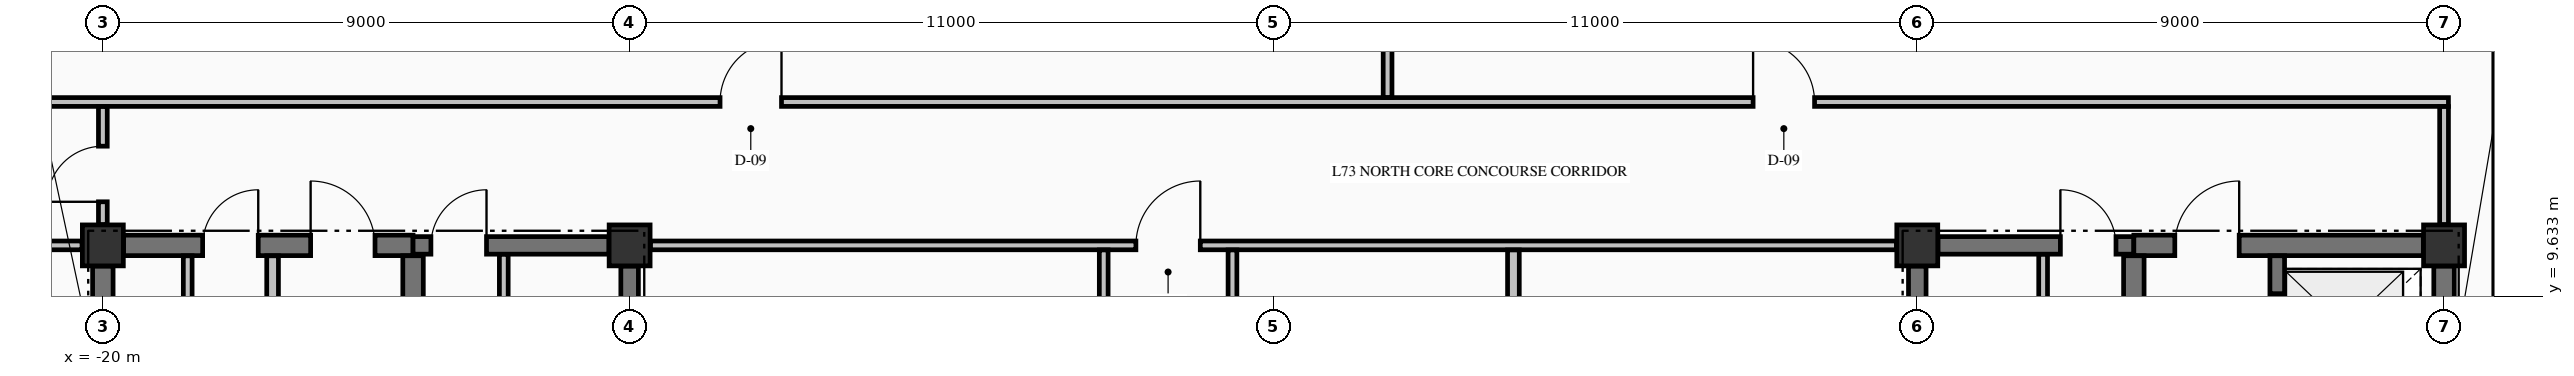
"""IFC4 building model, lengths in metres.
Left out: names, types, materials, properties, quantities, classifications, styles, units other than length and angle.
Written with IfcOpenShell. Run it as: python <this file> out.ifc"""

import sys

from ifc_helpers import new_model, si_unit, direction, frame, frame_2d, origin, origin_2d, place, context, subcontext, project, spatial, rectangle, extrude, element, fill, save


model = new_model("IFC4")
c1 = context("Model", 3, precision=1e-05, world=origin(), true_north=direction((0.0, 1.0)))
c2 = subcontext(c1, "Body", "Model", "MODEL_VIEW")
j1 = project(units=[si_unit("LENGTHUNIT", "METRE"), si_unit("PLANEANGLEUNIT", "RADIAN")], contexts=[c1])
p1 = place(None, origin())
s1 = spatial("IfcSite", under=j1, at=p1, CompositionType="ELEMENT")
p2 = place(p1, origin())
s2 = spatial("IfcBuilding", under=s1, at=p2, CompositionType="ELEMENT")
p3 = place(p2, frame((0.0, 0.0, 274.32)))
s3 = spatial("IfcBuildingStorey", under=s2, at=p3, CompositionType="ELEMENT", Elevation=274.32)
for number, where, z_axis, x_axis in (
    (1, (-20.0, 10.5, -0.25), (0.0, 0.0, 1.0), (1.0, 0.0, 0.0)),
    (2, (-11.0, 10.5, -0.25), (0.0, 0.0, 1.0), (1.0, 0.0, 0.0)),
    (3, (11.0, 10.5, -0.25), (0.0, 0.0, 1.0), (1.0, 0.0, 0.0)),
    (4, (20.0, 10.5, -0.25), (0.0, 0.0, 1.0), (1.0, 0.0, 0.0)),
):
    element("IfcColumn", number, at=place(p3, frame(where, z_axis=z_axis, x_axis=x_axis)), inside=s3, PredefinedType="COLUMN", context=c2, shape_type="SweptSolid", body=[
        extrude(rectangle(XDim=0.7, YDim=0.7, at=origin_2d()), origin(), (0.0, 0.0, 1.0), 3.565),
    ])
p4 = place(p3, frame((21.0, 9.455, 0.0), z_axis=(0.0, 0.0, 1.0), x_axis=(0.0, 1.0, 0.0)))
e5 = element("IfcWall", 5, at=p4, inside=s3, PredefinedType="STANDARD", context=c2, shape_type="SweptSolid", body=[
    extrude(rectangle(XDim=8.09, YDim=0.3, at=frame_2d((4.045, 0.0))), origin(), (0.0, 0.0, 1.0), 2.707),
])
p5 = place(p3, frame((-19.646, 10.5, 0.0), z_axis=(0.0, 0.0, 1.0), x_axis=(1.0, 0.0, 0.0)))
e6 = element("IfcWall", 6, at=p5, inside=s3, PredefinedType="SHEAR", context=c2, shape_type="SweptSolid", body=[
    extrude(rectangle(XDim=4.946, YDim=0.35, at=frame_2d((2.473, 0.0))), origin(), (0.0, 0.0, 1.0), 3.315),
])
p6 = place(p5, frame((3.196, 0.0, 0.0)))
e7 = element("IfcOpeningElement", 7, at=p6, cuts=e6, PredefinedType="OPENING", context=c2, shape_type="SweptSolid", body=[
    extrude(rectangle(XDim=1.1, YDim=2.15, at=frame_2d((0.55, 1.075))), frame((0.0, 0.185, 0.0), z_axis=(0.0, -1.0, 0.0), x_axis=(1.0, 0.0, 0.0)), (0.0, 0.0, 1.0), 0.37),
])
p7 = place(p5, frame((1.351, 0.0, 0.0)))
e8 = element("IfcOpeningElement", 8, at=p7, cuts=e6, PredefinedType="OPENING", context=c2, shape_type="SweptSolid", body=[
    extrude(rectangle(XDim=0.95, YDim=2.15, at=frame_2d((0.475, 1.075))), frame((0.0, 0.185, 0.0), z_axis=(0.0, -1.0, 0.0), x_axis=(1.0, 0.0, 0.0)), (0.0, 0.0, 1.0), 0.37),
])
p8 = place(p3, frame((-14.7, 10.5, 0.0), z_axis=(0.0, 0.0, 1.0), x_axis=(1.0, 0.0, 0.0)))
e9 = element("IfcWall", 9, at=p8, inside=s3, PredefinedType="SHEAR", context=c2, shape_type="SweptSolid", body=[
    extrude(rectangle(XDim=3.346, YDim=0.3, at=frame_2d((1.673, 0.0))), origin(), (0.0, 0.0, 1.0), 3.315),
])
p9 = place(p8, frame((0.305, 0.0, 0.0)))
e10 = element("IfcOpeningElement", 10, at=p9, cuts=e9, PredefinedType="OPENING", context=c2, shape_type="SweptSolid", body=[
    extrude(rectangle(XDim=0.95, YDim=2.15, at=frame_2d((0.475, 1.075))), frame((0.0, 0.16, 0.0), z_axis=(0.0, -1.0, 0.0), x_axis=(1.0, 0.0, 0.0)), (0.0, 0.0, 1.0), 0.32),
])
p10 = place(p3, frame((11.354, 10.5, 0.0), z_axis=(0.0, 0.0, 1.0), x_axis=(1.0, 0.0, 0.0)))
e11 = element("IfcWall", 11, at=p10, inside=s3, PredefinedType="SHEAR", context=c2, shape_type="SweptSolid", body=[
    extrude(rectangle(XDim=3.346, YDim=0.3, at=frame_2d((1.673, 0.0))), origin(), (0.0, 0.0, 1.0), 3.315),
])
p11 = place(p10, frame((2.091, 0.0, 0.0)))
e12 = element("IfcOpeningElement", 12, at=p11, cuts=e11, PredefinedType="OPENING", context=c2, shape_type="SweptSolid", body=[
    extrude(rectangle(XDim=0.95, YDim=2.15, at=frame_2d((0.475, 1.075))), frame((0.0, 0.16, 0.0), z_axis=(0.0, -1.0, 0.0), x_axis=(1.0, 0.0, 0.0)), (0.0, 0.0, 1.0), 0.32),
])
p12 = place(p3, frame((14.7, 10.5, 0.0), z_axis=(0.0, 0.0, 1.0), x_axis=(1.0, 0.0, 0.0)))
e13 = element("IfcWall", 13, at=p12, inside=s3, PredefinedType="SHEAR", context=c2, shape_type="SweptSolid", body=[
    extrude(rectangle(XDim=4.946, YDim=0.35, at=frame_2d((2.473, 0.0))), origin(), (0.0, 0.0, 1.0), 3.315),
])
p13 = place(p12, frame((0.7, 0.0, 0.0)))
e14 = element("IfcOpeningElement", 14, at=p13, cuts=e13, PredefinedType="OPENING", context=c2, shape_type="SweptSolid", body=[
    extrude(rectangle(XDim=1.1, YDim=2.15, at=frame_2d((0.55, 1.075))), frame((0.0, 0.185, 0.0), z_axis=(0.0, -1.0, 0.0), x_axis=(1.0, 0.0, 0.0)), (0.0, 0.0, 1.0), 0.37),
])
p14 = place(p3, frame((-25.835, 10.5, 0.0), z_axis=(0.0, 0.0, 1.0), x_axis=(1.0, 0.0, 0.0)))
e15 = element("IfcWall", 15, at=p14, inside=s3, PredefinedType="PARTITIONING", context=c2, shape_type="SweptSolid", body=[
    extrude(rectangle(XDim=5.479, YDim=0.15, at=frame_2d((2.74, 0.0))), origin(), (0.0, 0.0, 1.0), 3.315),
])
p15 = place(p14, frame((2.335, 0.0, 0.0)))
e16 = element("IfcOpeningElement", 16, at=p15, cuts=e15, PredefinedType="OPENING", context=c2, shape_type="SweptSolid", body=[
    extrude(rectangle(XDim=1.0, YDim=2.15, at=frame_2d((0.5, 1.075))), frame((0.0, 0.085, 0.0), z_axis=(0.0, -1.0, 0.0), x_axis=(1.0, 0.0, 0.0)), (0.0, 0.0, 1.0), 0.17),
])
p16 = place(p3, frame((-10.644, 10.5, 0.0), z_axis=(0.0, 0.0, 1.0), x_axis=(1.0, 0.0, 0.0)))
e17 = element("IfcWall", 17, at=p16, inside=s3, PredefinedType="PARTITIONING", context=c2, shape_type="SweptSolid", body=[
    extrude(rectangle(XDim=21.288, YDim=0.15, at=frame_2d((10.644, 0.0))), origin(), (0.0, 0.0, 1.0), 3.315),
])
p17 = place(p16, frame((8.294, 0.0, 0.0)))
e18 = element("IfcOpeningElement", 18, at=p17, cuts=e17, PredefinedType="OPENING", context=c2, shape_type="SweptSolid", body=[
    extrude(rectangle(XDim=1.1, YDim=2.15, at=frame_2d((0.55, 1.075))), frame((0.0, 0.085, 0.0), z_axis=(0.0, -1.0, 0.0), x_axis=(1.0, 0.0, 0.0)), (0.0, 0.0, 1.0), 0.17),
])
p18 = place(p3, frame((-25.835, 12.95, 0.0), z_axis=(0.0, 0.0, 1.0), x_axis=(1.0, 0.0, 0.0)))
e19 = element("IfcWall", 19, at=p18, inside=s3, PredefinedType="PARTITIONING", context=c2, shape_type="SweptSolid", body=[
    extrude(rectangle(XDim=45.91, YDim=0.15, at=frame_2d((22.955, 0.0))), origin(), (0.0, 0.0, 1.0), 3.315),
])
p19 = place(p18, frame((16.38, 0.0, 0.0)))
e20 = element("IfcOpeningElement", 20, at=p19, cuts=e19, PredefinedType="OPENING", context=c2, shape_type="SweptSolid", body=[
    extrude(rectangle(XDim=1.05, YDim=2.15, at=frame_2d((0.525, 1.075))), frame((0.0, 0.085, 0.0), z_axis=(0.0, -1.0, 0.0), x_axis=(1.0, 0.0, 0.0)), (0.0, 0.0, 1.0), 0.17),
])
p20 = place(p18, frame((34.03, 0.0, 0.0)))
e21 = element("IfcOpeningElement", 21, at=p20, cuts=e19, PredefinedType="OPENING", context=c2, shape_type="SweptSolid", body=[
    extrude(rectangle(XDim=1.05, YDim=2.15, at=frame_2d((0.525, 1.075))), frame((0.0, 0.085, 0.0), z_axis=(0.0, -1.0, 0.0), x_axis=(1.0, 0.0, 0.0)), (0.0, 0.0, 1.0), 0.17),
])
p21 = place(p3, frame((-20.0, 5.327, 0.0), z_axis=(0.0, 0.0, 1.0), x_axis=(0.0, 1.0, 0.0)))
e22 = element("IfcWall", 22, at=p21, inside=s3, PredefinedType="SHEAR", context=c2, shape_type="SweptSolid", body=[
    extrude(rectangle(XDim=4.819, YDim=0.35, at=frame_2d((2.41, 0.0))), origin(), (0.0, 0.0, 1.0), 3.315),
])
p22 = place(p3, frame((-14.7, 5.852, 0.0), z_axis=(0.0, 0.0, 1.0), x_axis=(0.0, 1.0, 0.0)))
e23 = element("IfcWall", 23, at=p22, inside=s3, PredefinedType="SHEAR", context=c2, shape_type="SweptSolid", body=[
    extrude(rectangle(XDim=4.471, YDim=0.35, at=frame_2d((2.235, 0.0))), origin(), (0.0, 0.0, 1.0), 3.315),
])
for number, where, z_axis, x_axis in (
    (24, (-11.0, 5.852, 0.0), (0.0, 0.0, 1.0), (0.0, 1.0, 0.0)),
    (25, (11.0, 5.852, 0.0), (0.0, 0.0, 1.0), (0.0, 1.0, 0.0)),
):
    element("IfcWall", number, at=place(p3, frame(where, z_axis=z_axis, x_axis=x_axis)), inside=s3, PredefinedType="SHEAR", context=c2, shape_type="SweptSolid", body=[
        extrude(rectangle(XDim=4.294, YDim=0.3, at=frame_2d((2.147, 0.0))), origin(), (0.0, 0.0, 1.0), 3.315),
    ])
p23 = place(p3, frame((14.7, 5.852, 0.0), z_axis=(0.0, 0.0, 1.0), x_axis=(0.0, 1.0, 0.0)))
e26 = element("IfcWall", 26, at=p23, inside=s3, PredefinedType="SHEAR", context=c2, shape_type="SweptSolid", body=[
    extrude(rectangle(XDim=4.471, YDim=0.35, at=frame_2d((2.235, 0.0))), origin(), (0.0, 0.0, 1.0), 3.315),
])
p24 = place(p3, frame((17.15, 7.877, 0.0), z_axis=(0.0, 0.0, 1.0), x_axis=(0.0, 1.0, 0.0)))
e27 = element("IfcWall", 27, at=p24, inside=s3, PredefinedType="SOLIDWALL", context=c2, shape_type="SweptSolid", body=[
    extrude(rectangle(XDim=2.446, YDim=0.25, at=frame_2d((1.223, 0.0))), origin(), (0.0, 0.0, 1.0), 3.315),
])
p25 = place(p24, frame((0.698, 0.0, 0.0)))
e28 = element("IfcOpeningElement", 28, at=p25, cuts=e27, PredefinedType="OPENING", context=c2, shape_type="SweptSolid", body=[
    extrude(rectangle(XDim=1.1, YDim=2.2, at=frame_2d((0.55, 1.1))), frame((0.0, 0.135, 0.0), z_axis=(0.0, -1.0, 0.0), x_axis=(1.0, 0.0, 0.0)), (0.0, 0.0, 1.0), 0.27),
])
p26 = place(p3, frame((20.0, 7.877, 0.0), z_axis=(0.0, 0.0, 1.0), x_axis=(0.0, 1.0, 0.0)))
e29 = element("IfcWall", 29, at=p26, inside=s3, PredefinedType="SHEAR", context=c2, shape_type="SweptSolid", body=[
    extrude(rectangle(XDim=2.269, YDim=0.35, at=frame_2d((1.135, 0.0))), origin(), (0.0, 0.0, 1.0), 3.315),
])
p27 = place(p3, frame((-20.0, 10.856, 0.0), z_axis=(0.0, 0.0, 1.0), x_axis=(0.0, 1.0, 0.0)))
e30 = element("IfcWall", 30, at=p27, inside=s3, PredefinedType="PARTITIONING", context=c2, shape_type="SweptSolid", body=[
    extrude(rectangle(XDim=2.016, YDim=0.15, at=frame_2d((1.008, 0.0))), origin(), (0.0, 0.0, 1.0), 3.315),
])
p28 = place(p27, frame((0.389, 0.0, 0.0)))
e31 = element("IfcOpeningElement", 31, at=p28, cuts=e30, PredefinedType="OPENING", context=c2, shape_type="SweptSolid", body=[
    extrude(rectangle(XDim=0.95, YDim=2.15, at=frame_2d((0.475, 1.075))), frame((0.0, 0.085, 0.0), z_axis=(0.0, -1.0, 0.0), x_axis=(1.0, 0.0, 0.0)), (0.0, 0.0, 1.0), 0.17),
])
p29 = place(p3, frame((-18.55, 5.328, 0.0), z_axis=(0.0, 0.0, 1.0), x_axis=(0.0, 1.0, 0.0)))
e32 = element("IfcWall", 32, at=p29, inside=s3, PredefinedType="PARTITIONING", context=c2, shape_type="SweptSolid", body=[
    extrude(rectangle(XDim=4.994, YDim=0.15, at=frame_2d((2.497, 0.0))), origin(), (0.0, 0.0, 1.0), 3.315),
])
p30 = place(p29, frame((2.047, 0.0, 0.0)))
e33 = element("IfcOpeningElement", 33, at=p30, cuts=e32, PredefinedType="OPENING", context=c2, shape_type="SweptSolid", body=[
    extrude(rectangle(XDim=0.95, YDim=2.15, at=frame_2d((0.475, 1.075))), frame((0.0, 0.085, 0.0), z_axis=(0.0, -1.0, 0.0), x_axis=(1.0, 0.0, 0.0)), (0.0, 0.0, 1.0), 0.17),
])
p31 = place(p3, frame((-17.1, 5.328, 0.0), z_axis=(0.0, 0.0, 1.0), x_axis=(0.0, 1.0, 0.0)))
e34 = element("IfcWall", 34, at=p31, inside=s3, PredefinedType="PARTITIONING", context=c2, shape_type="SweptSolid", body=[
    extrude(rectangle(XDim=4.994, YDim=0.2, at=frame_2d((2.497, 0.0))), origin(), (0.0, 0.0, 1.0), 3.315),
])
p32 = place(p3, frame((-13.15, 7.228, 0.0), z_axis=(0.0, 0.0, 1.0), x_axis=(0.0, 1.0, 0.0)))
e35 = element("IfcWall", 35, at=p32, inside=s3, PredefinedType="PARTITIONING", context=c2, shape_type="SweptSolid", body=[
    extrude(rectangle(XDim=3.119, YDim=0.15, at=frame_2d((1.56, 0.0))), origin(), (0.0, 0.0, 1.0), 3.315),
])
p33 = place(p32, frame((1.097, 0.0, 0.0)))
e36 = element("IfcOpeningElement", 36, at=p33, cuts=e35, PredefinedType="OPENING", context=c2, shape_type="SweptSolid", body=[
    extrude(rectangle(XDim=0.95, YDim=2.15, at=frame_2d((0.475, 1.075))), frame((0.0, 0.085, 0.0), z_axis=(0.0, -1.0, 0.0), x_axis=(1.0, 0.0, 0.0)), (0.0, 0.0, 1.0), 0.17),
])
for number, where, z_axis, x_axis in (
    (37, (-2.9, 2.978, 0.0), (0.0, 0.0, 1.0), (0.0, 1.0, 0.0)),
    (38, (-0.7, 2.978, 0.0), (0.0, 0.0, 1.0), (0.0, 1.0, 0.0)),
):
    element("IfcWall", number, at=place(p3, frame(where, z_axis=z_axis, x_axis=x_axis)), inside=s3, PredefinedType="PARTITIONING", context=c2, shape_type="SweptSolid", body=[
        extrude(rectangle(XDim=7.444, YDim=0.15, at=frame_2d((3.722, 0.0))), origin(), (0.0, 0.0, 1.0), 3.315),
    ])
p34 = place(p3, frame((1.95, 13.028, 0.0), z_axis=(0.0, 0.0, 1.0), x_axis=(0.0, 1.0, 0.0)))
e39 = element("IfcWall", 39, at=p34, inside=s3, PredefinedType="PARTITIONING", context=c2, shape_type="SweptSolid", body=[
    extrude(rectangle(XDim=10.307, YDim=0.15, at=frame_2d((5.153, 0.0))), origin(), (0.0, 0.0, 1.0), 3.315),
])
p35 = place(p3, frame((4.1, 2.978, 0.0), z_axis=(0.0, 0.0, 1.0), x_axis=(0.0, 1.0, 0.0)))
e40 = element("IfcWall", 40, at=p35, inside=s3, PredefinedType="PARTITIONING", context=c2, shape_type="SweptSolid", body=[
    extrude(rectangle(XDim=7.444, YDim=0.2, at=frame_2d((3.722, 0.0))), origin(), (0.0, 0.0, 1.0), 3.315),
])
p36 = place(p3, frame((13.15, 7.228, 0.0), z_axis=(0.0, 0.0, 1.0), x_axis=(0.0, 1.0, 0.0)))
e41 = element("IfcWall", 41, at=p36, inside=s3, PredefinedType="PARTITIONING", context=c2, shape_type="SweptSolid", body=[
    extrude(rectangle(XDim=3.119, YDim=0.15, at=frame_2d((1.56, 0.0))), origin(), (0.0, 0.0, 1.0), 3.315),
])
p37 = place(p36, frame((1.097, 0.0, 0.0)))
e42 = element("IfcOpeningElement", 42, at=p37, cuts=e41, PredefinedType="OPENING", context=c2, shape_type="SweptSolid", body=[
    extrude(rectangle(XDim=0.95, YDim=2.15, at=frame_2d((0.475, 1.075))), frame((0.0, 0.085, 0.0), z_axis=(0.0, -1.0, 0.0), x_axis=(1.0, 0.0, 0.0)), (0.0, 0.0, 1.0), 0.17),
])
p38 = place(p3, frame((20.0, 10.856, 0.0), z_axis=(0.0, 0.0, 1.0), x_axis=(0.0, 1.0, 0.0)))
e43 = element("IfcWall", 43, at=p38, inside=s3, PredefinedType="PARTITIONING", context=c2, shape_type="SweptSolid", body=[
    extrude(rectangle(XDim=2.016, YDim=0.15, at=frame_2d((1.008, 0.0))), origin(), (0.0, 0.0, 1.0), 2.905),
])
p39 = place(p9, origin())
e44 = element("IfcDoor", 44, at=p39, inside=s3, OperationType="SINGLE_SWING_RIGHT", PredefinedType="DOOR", context=c2, shape_type="SweptSolid", body=[
    extrude(rectangle(XDim=0.95, YDim=2.15, at=frame_2d((0.475, 1.075))), frame((0.0, 0.025, 0.0), z_axis=(0.0, -1.0, 0.0), x_axis=(1.0, 0.0, 0.0)), (0.0, 0.0, 1.0), 0.05),
])
fill(e10, e44)
p40 = place(p11, origin())
e45 = element("IfcDoor", 45, at=p40, inside=s3, OperationType="SINGLE_SWING_LEFT", PredefinedType="DOOR", context=c2, shape_type="SweptSolid", body=[
    extrude(rectangle(XDim=0.95, YDim=2.15, at=frame_2d((0.475, 1.075))), frame((0.0, 0.025, 0.0), z_axis=(0.0, -1.0, 0.0), x_axis=(1.0, 0.0, 0.0)), (0.0, 0.0, 1.0), 0.05),
])
fill(e12, e45)
p41 = place(p6, origin())
e46 = element("IfcDoor", 46, at=p41, inside=s3, OperationType="SINGLE_SWING_LEFT", PredefinedType="DOOR", context=c2, shape_type="SweptSolid", body=[
    extrude(rectangle(XDim=1.1, YDim=2.15, at=frame_2d((0.55, 1.075))), frame((0.0, 0.025, 0.0), z_axis=(0.0, -1.0, 0.0), x_axis=(1.0, 0.0, 0.0)), (0.0, 0.0, 1.0), 0.05),
])
fill(e7, e46)
p42 = place(p7, origin())
e47 = element("IfcDoor", 47, at=p42, inside=s3, OperationType="SINGLE_SWING_RIGHT", PredefinedType="DOOR", context=c2, shape_type="SweptSolid", body=[
    extrude(rectangle(XDim=0.95, YDim=2.15, at=frame_2d((0.475, 1.075))), frame((0.0, 0.025, 0.0), z_axis=(0.0, -1.0, 0.0), x_axis=(1.0, 0.0, 0.0)), (0.0, 0.0, 1.0), 0.05),
])
fill(e8, e47)
p43 = place(p25, origin())
e48 = element("IfcDoor", 48, at=p43, inside=s3, OperationType="SLIDING_TO_RIGHT", PredefinedType="DOOR", context=c2, shape_type="SweptSolid", body=[
    extrude(rectangle(XDim=1.1, YDim=2.2, at=frame_2d((0.55, 1.1))), frame((0.0, 0.025, 0.0), z_axis=(0.0, -1.0, 0.0), x_axis=(1.0, 0.0, 0.0)), (0.0, 0.0, 1.0), 0.05),
])
fill(e28, e48)
p44 = place(p13, origin())
e49 = element("IfcDoor", 49, at=p44, inside=s3, OperationType="SINGLE_SWING_RIGHT", PredefinedType="DOOR", context=c2, shape_type="SweptSolid", body=[
    extrude(rectangle(XDim=1.1, YDim=2.15, at=frame_2d((0.55, 1.075))), frame((0.0, 0.025, 0.0), z_axis=(0.0, -1.0, 0.0), x_axis=(1.0, 0.0, 0.0)), (0.0, 0.0, 1.0), 0.05),
])
fill(e14, e49)
p45 = place(p17, origin())
e50 = element("IfcDoor", 50, at=p45, inside=s3, OperationType="SINGLE_SWING_RIGHT", PredefinedType="DOOR", context=c2, shape_type="SweptSolid", body=[
    extrude(rectangle(XDim=1.1, YDim=2.15, at=frame_2d((0.55, 1.075))), frame((0.0, 0.025, 0.0), z_axis=(0.0, -1.0, 0.0), x_axis=(1.0, 0.0, 0.0)), (0.0, 0.0, 1.0), 0.05),
])
fill(e18, e50)
p46 = place(p19, origin())
e51 = element("IfcDoor", 51, at=p46, inside=s3, OperationType="SINGLE_SWING_RIGHT", PredefinedType="DOOR", context=c2, shape_type="SweptSolid", body=[
    extrude(rectangle(XDim=1.05, YDim=2.15, at=frame_2d((0.525, 1.075))), frame((0.0, 0.025, 0.0), z_axis=(0.0, -1.0, 0.0), x_axis=(1.0, 0.0, 0.0)), (0.0, 0.0, 1.0), 0.05),
])
fill(e20, e51)
p47 = place(p20, origin())
e52 = element("IfcDoor", 52, at=p47, inside=s3, OperationType="SINGLE_SWING_LEFT", PredefinedType="DOOR", context=c2, shape_type="SweptSolid", body=[
    extrude(rectangle(XDim=1.05, YDim=2.15, at=frame_2d((0.525, 1.075))), frame((0.0, 0.025, 0.0), z_axis=(0.0, -1.0, 0.0), x_axis=(1.0, 0.0, 0.0)), (0.0, 0.0, 1.0), 0.05),
])
fill(e21, e52)
p48 = place(p28, origin())
e53 = element("IfcDoor", 53, at=p48, inside=s3, OperationType="SINGLE_SWING_LEFT", PredefinedType="DOOR", context=c2, shape_type="SweptSolid", body=[
    extrude(rectangle(XDim=0.95, YDim=2.15, at=frame_2d((0.475, 1.075))), frame((0.0, 0.025, 0.0), z_axis=(0.0, -1.0, 0.0), x_axis=(1.0, 0.0, 0.0)), (0.0, 0.0, 1.0), 0.05),
])
fill(e31, e53)
save(model, sys.argv[1])
